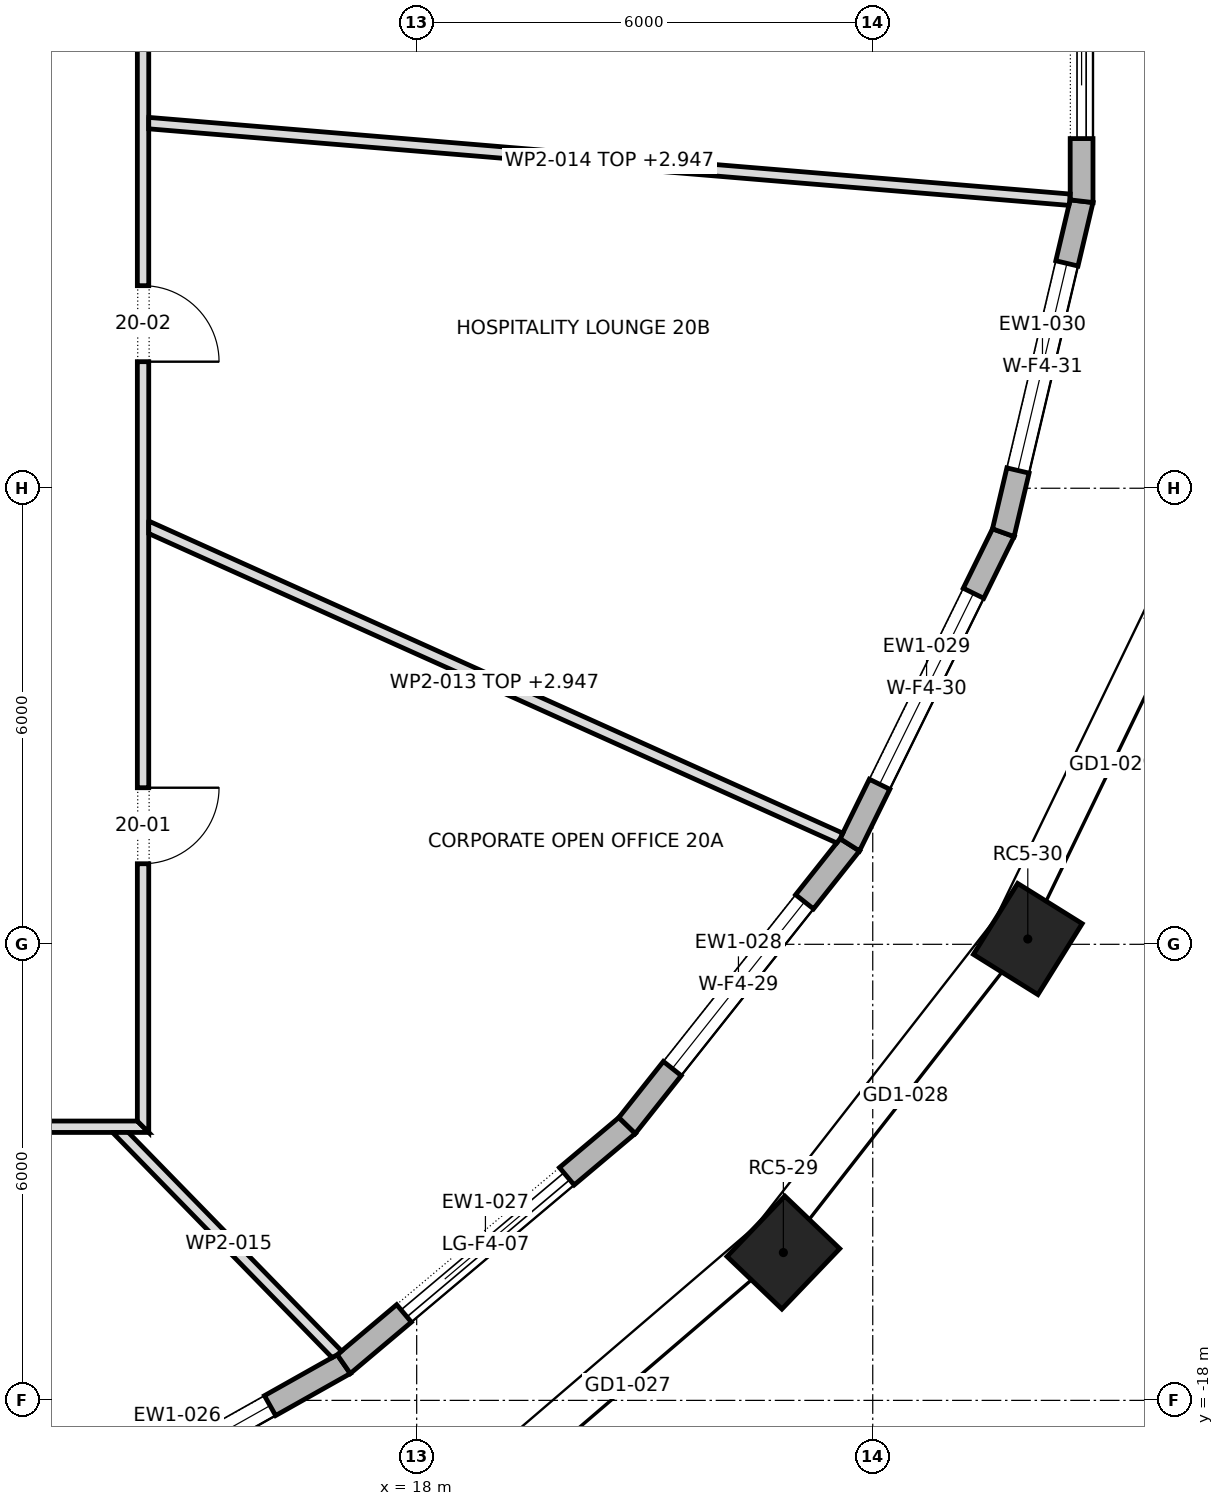
"""IFC4 building model, lengths in metres.
Left out: names, types, materials, properties, quantities, classifications, styles, units other than length and angle.
Written with IfcOpenShell. Run it as: python <this file> out.ifc"""

import sys

from ifc_helpers import new_model, si_unit, direction, frame, frame_2d, origin, origin_2d, place, context, subcontext, project, spatial, polyline, rectangle, outline, extrude, element, fill, save


model = new_model("IFC4")
c1 = context("Model", 3, precision=1e-05, world=origin(), true_north=direction((0.0, 1.0)))
c2 = subcontext(c1, "Body", "Model", "MODEL_VIEW")
j1 = project(units=[si_unit("LENGTHUNIT", "METRE"), si_unit("PLANEANGLEUNIT", "RADIAN")], contexts=[c1])
p1 = place(None, origin())
s1 = spatial("IfcSite", under=j1, at=p1, CompositionType="ELEMENT")
p2 = place(p1, origin())
s2 = spatial("IfcBuilding", under=s1, at=p2, CompositionType="ELEMENT")
p3 = place(p2, frame((0.0, 0.0, 280.3)))
s3 = spatial("IfcBuildingStorey", under=s2, at=p3, CompositionType="ELEMENT", Elevation=280.3)
for number, where, z_axis, x_axis in (
    (1, (22.824, -16.055, 0.0), (0.0, 0.0, 1.0), (0.692, 0.722, 0.0)),
    (2, (26.04, -11.93, 0.0), (0.0, 0.0, 1.0), (0.529, 0.849, 0.0)),
):
    element("IfcColumn", number, at=place(p3, frame(where, z_axis=z_axis, x_axis=x_axis)), inside=s3, PredefinedType="COLUMN", context=c2, shape_type="SweptSolid", body=[
        extrude(rectangle(XDim=1.1, YDim=1.0, at=origin_2d()), origin(), (0.0, 0.0, 1.0), 4.0),
    ])
p4 = place(p3, frame((12.661, -19.988, 0.0), z_axis=(0.0, 0.0, 1.0), x_axis=(0.871488606878, 0.490415750239, 0.0)))
e3 = element("IfcWall", 3, at=p4, inside=s3, PredefinedType="STANDARD", context=c2, shape_type="SweptSolid", body=[
    extrude(outline(polyline([(-0.013, -0.15), (5.04, -0.15), (5.012, 0.15), (0.013, 0.15), (-0.013, -0.15)])), origin(), (0.0, 0.0, 1.0), 3.7),
])
p5 = place(p4, frame((1.113, 0.0, 0.6)))
e4 = element("IfcOpeningElement", 4, at=p5, cuts=e3, PredefinedType="OPENING", context=c2, shape_type="SweptSolid", body=[
    extrude(rectangle(XDim=2.8, YDim=2.65, at=frame_2d((1.4, 1.325))), frame((0.0, 0.162, 0.0), z_axis=(0.0, -1.0, 0.0), x_axis=(1.0, 0.0, 0.0)), (0.0, 0.0, 1.0), 0.324),
])
p6 = place(p3, frame((17.041, -17.523, 0.0), z_axis=(0.0, 0.0, 1.0), x_axis=(0.764876116592, 0.644177402792, 0.0)))
e5 = element("IfcWall", 5, at=p6, inside=s3, PredefinedType="STANDARD", context=c2, shape_type="SweptSolid", body=[
    extrude(outline(polyline([(-0.014, -0.15), (4.888, -0.15), (4.858, 0.15), (0.014, 0.15), (-0.014, -0.15)])), origin(), (0.0, 0.0, 1.0), 3.7),
])
p7 = place(p6, frame((1.036, 0.0, 0.0)))
e6 = element("IfcOpeningElement", 6, at=p7, cuts=e5, PredefinedType="OPENING", context=c2, shape_type="SweptSolid", body=[
    extrude(rectangle(XDim=2.8, YDim=3.25, at=frame_2d((1.4, 1.625))), frame((0.0, 0.162, 0.0), z_axis=(0.0, -1.0, 0.0), x_axis=(1.0, 0.0, 0.0)), (0.0, 0.0, 1.0), 0.324),
])
p8 = place(p3, frame((20.768, -14.384, 0.0), z_axis=(0.0, 0.0, 1.0), x_axis=(0.621544881236, 0.783378555112, 0.0)))
e7 = element("IfcWall", 7, at=p8, inside=s3, PredefinedType="STANDARD", context=c2, shape_type="SweptSolid", body=[
    extrude(outline(polyline([(-0.015, -0.15), (4.73, -0.15), (4.698, 0.15), (0.015, 0.15), (-0.015, -0.15)])), origin(), (0.0, 0.0, 1.0), 3.7),
])
p9 = place(p8, frame((0.957, 0.0, 0.6)))
e8 = element("IfcOpeningElement", 8, at=p9, cuts=e7, PredefinedType="OPENING", context=c2, shape_type="SweptSolid", body=[
    extrude(rectangle(XDim=2.8, YDim=2.65, at=frame_2d((1.4, 1.325))), frame((0.0, 0.162, 0.0), z_axis=(0.0, -1.0, 0.0), x_axis=(1.0, 0.0, 0.0)), (0.0, 0.0, 1.0), 0.324),
])
p10 = place(p3, frame((23.698, -10.691, 0.0), z_axis=(0.0, 0.0, 1.0), x_axis=(0.441335149795, 0.897342345794, 0.0)))
e9 = element("IfcWall", 9, at=p10, inside=s3, PredefinedType="STANDARD", context=c2, shape_type="SweptSolid", body=[
    extrude(outline(polyline([(-0.016, -0.15), (4.593, -0.15), (4.559, 0.15), (0.016, 0.15), (-0.016, -0.15)])), origin(), (0.0, 0.0, 1.0), 3.7),
])
p11 = place(p10, frame((0.888, 0.0, 0.6)))
e10 = element("IfcOpeningElement", 10, at=p11, cuts=e9, PredefinedType="OPENING", context=c2, shape_type="SweptSolid", body=[
    extrude(rectangle(XDim=2.8, YDim=2.65, at=frame_2d((1.4, 1.325))), frame((0.0, 0.162, 0.0), z_axis=(0.0, -1.0, 0.0), x_axis=(1.0, 0.0, 0.0)), (0.0, 0.0, 1.0), 0.324),
])
p12 = place(p3, frame((25.718, -6.585, 0.0), z_axis=(0.0, 0.0, 1.0), x_axis=(0.229862207503, 0.973223183839, 0.0)))
e11 = element("IfcWall", 11, at=p12, inside=s3, PredefinedType="STANDARD", context=c2, shape_type="SweptSolid", body=[
    extrude(outline(polyline([(-0.017, -0.15), (4.499, -0.15), (4.463, 0.15), (0.017, 0.15), (-0.017, -0.15)])), origin(), (0.0, 0.0, 1.0), 3.7),
])
p13 = place(p12, frame((0.841, 0.0, 0.6)))
e12 = element("IfcOpeningElement", 12, at=p13, cuts=e11, PredefinedType="OPENING", context=c2, shape_type="SweptSolid", body=[
    extrude(rectangle(XDim=2.8, YDim=2.65, at=frame_2d((1.4, 1.325))), frame((0.0, 0.162, 0.0), z_axis=(0.0, -1.0, 0.0), x_axis=(1.0, 0.0, 0.0)), (0.0, 0.0, 1.0), 0.324),
])
p14 = place(p3, frame((26.748, -2.224, 0.0), z_axis=(0.0, 0.0, 1.0), x_axis=(0.0, 1.0, 0.0)))
e13 = element("IfcWall", 13, at=p14, inside=s3, PredefinedType="STANDARD", context=c2, shape_type="SweptSolid", body=[
    extrude(outline(polyline([(-0.018, -0.15), (4.465, -0.15), (4.43, 0.15), (0.018, 0.15), (-0.018, -0.15)])), origin(), (0.0, 0.0, 1.0), 3.7),
])
p15 = place(p14, frame((0.824, 0.0, 0.0)))
e14 = element("IfcOpeningElement", 14, at=p15, cuts=e13, PredefinedType="OPENING", context=c2, shape_type="SweptSolid", body=[
    extrude(rectangle(XDim=2.8, YDim=3.25, at=frame_2d((1.4, 1.625))), frame((0.0, 0.162, 0.0), z_axis=(0.0, -1.0, 0.0), x_axis=(1.0, 0.0, 0.0)), (0.0, 0.0, 1.0), 0.324),
])
p16 = place(p3, frame((-14.475, -14.4, 0.0), z_axis=(0.0, 0.0, 1.0), x_axis=(1.0, 0.0, 0.0)))
e15 = element("IfcWall", 15, at=p16, inside=s3, PredefinedType="PARTITIONING", context=c2, shape_type="SweptSolid", body=[
    extrude(outline(polyline([(0.0, -0.075), (1.93, -0.075), (3.86, -0.075), (5.79, -0.075), (7.72, -0.075), (9.65, -0.075), (11.58, -0.075), (13.51, -0.075), (15.44, -0.075), (17.37, -0.075), (19.3, -0.075), (21.23, -0.075), (23.16, -0.075), (25.09, -0.075), (27.02, -0.075), (28.95, -0.075), (28.8, 0.075), (26.89, 0.075), (24.98, 0.075), (23.07, 0.075), (21.16, 0.075), (19.25, 0.075), (17.34, 0.075), (15.43, 0.075), (13.52, 0.075), (11.61, 0.075), (9.7, 0.075), (7.79, 0.075), (5.88, 0.075), (3.97, 0.075), (2.06, 0.075), (0.15, 0.075), (0.0, -0.075)])), origin(), (0.0, 0.0, 1.0), 3.7),
])
p17 = place(p16, frame((5.535, 0.0, 0.0)))
e16 = element("IfcOpeningElement", 16, at=p17, cuts=e15, PredefinedType="OPENING", context=c2, shape_type="SweptSolid", body=[
    extrude(rectangle(XDim=1.8, YDim=2.1, at=frame_2d((0.9, 1.05))), frame((0.0, 0.087, 0.0), z_axis=(0.0, -1.0, 0.0), x_axis=(1.0, 0.0, 0.0)), (0.0, 0.0, 1.0), 0.174),
])
p18 = place(p16, frame((15.73, 0.0, 0.0)))
e17 = element("IfcOpeningElement", 17, at=p18, cuts=e15, PredefinedType="OPENING", context=c2, shape_type="SweptSolid", body=[
    extrude(rectangle(XDim=1.0, YDim=2.1, at=frame_2d((0.5, 1.05))), frame((0.0, 0.087, 0.0), z_axis=(0.0, -1.0, 0.0), x_axis=(1.0, 0.0, 0.0)), (0.0, 0.0, 1.0), 0.174),
])
p19 = place(p16, frame((23.585, 0.0, 0.0)))
e18 = element("IfcOpeningElement", 18, at=p19, cuts=e15, PredefinedType="OPENING", context=c2, shape_type="SweptSolid", body=[
    extrude(rectangle(XDim=1.0, YDim=2.1, at=frame_2d((0.5, 1.05))), frame((0.0, 0.087, 0.0), z_axis=(0.0, -1.0, 0.0), x_axis=(1.0, 0.0, 0.0)), (0.0, 0.0, 1.0), 0.174),
])
p20 = place(p3, frame((14.4, -14.475, 0.0), z_axis=(0.0, 0.0, 1.0), x_axis=(0.0, 1.0, 0.0)))
e19 = element("IfcWall", 19, at=p20, inside=s3, PredefinedType="PARTITIONING", context=c2, shape_type="SweptSolid", body=[
    extrude(outline(polyline([(0.0, -0.075), (1.93, -0.075), (3.86, -0.075), (5.79, -0.075), (7.72, -0.075), (9.65, -0.075), (11.58, -0.075), (13.51, -0.075), (15.44, -0.075), (17.37, -0.075), (19.3, -0.075), (21.23, -0.075), (23.16, -0.075), (25.09, -0.075), (27.02, -0.075), (28.95, -0.075), (28.8, 0.075), (26.89, 0.075), (24.98, 0.075), (23.07, 0.075), (21.16, 0.075), (19.25, 0.075), (17.34, 0.075), (15.43, 0.075), (13.52, 0.075), (11.61, 0.075), (9.7, 0.075), (7.79, 0.075), (5.88, 0.075), (3.97, 0.075), (2.06, 0.075), (0.15, 0.075), (0.0, -0.075)])), origin(), (0.0, 0.0, 1.0), 3.7),
])
p21 = place(p20, frame((3.535, 0.0, 0.0)))
e20 = element("IfcOpeningElement", 20, at=p21, cuts=e19, PredefinedType="OPENING", context=c2, shape_type="SweptSolid", body=[
    extrude(rectangle(XDim=1.0, YDim=2.1, at=frame_2d((0.5, 1.05))), frame((0.0, 0.087, 0.0), z_axis=(0.0, -1.0, 0.0), x_axis=(1.0, 0.0, 0.0)), (0.0, 0.0, 1.0), 0.174),
])
p22 = place(p20, frame((10.14, 0.0, 0.0)))
e21 = element("IfcOpeningElement", 21, at=p22, cuts=e19, PredefinedType="OPENING", context=c2, shape_type="SweptSolid", body=[
    extrude(rectangle(XDim=1.0, YDim=2.1, at=frame_2d((0.5, 1.05))), frame((0.0, 0.087, 0.0), z_axis=(0.0, -1.0, 0.0), x_axis=(1.0, 0.0, 0.0)), (0.0, 0.0, 1.0), 0.174),
])
p23 = place(p20, frame((20.18, 0.0, 0.0)))
e22 = element("IfcOpeningElement", 22, at=p23, cuts=e19, PredefinedType="OPENING", context=c2, shape_type="SweptSolid", body=[
    extrude(rectangle(XDim=1.8, YDim=2.1, at=frame_2d((0.9, 1.05))), frame((0.0, 0.087, 0.0), z_axis=(0.0, -1.0, 0.0), x_axis=(1.0, 0.0, 0.0)), (0.0, 0.0, 1.0), 0.174),
])
p24 = place(p3, frame((14.445, -6.5, 0.0), z_axis=(0.0, 0.0, 1.0), x_axis=(0.912008635086, -0.410171000351, 0.0)))
e23 = element("IfcWall", 23, at=p24, inside=s3, PredefinedType="PARTITIONING", context=c2, shape_type="SweptSolid", body=[
    extrude(outline(polyline([(0.067, -0.075), (2.052, -0.075), (4.037, -0.075), (6.021, -0.075), (8.006, -0.075), (9.991, -0.075), (10.009, -0.005), (10.011, 0.071), (10.011, 0.075), (8.343, 0.075), (6.674, 0.075), (5.006, 0.075), (3.337, 0.075), (1.668, 0.075), (0.0, 0.075), (0.0, 0.074), (0.067, -0.075)])), origin(), (0.0, 0.0, 1.0), 2.947),
])
p25 = place(p3, frame((14.469, -1.196, 0.0), z_axis=(0.0, 0.0, 1.0), x_axis=(0.996556684965, -0.08291425481, 0.0)))
e24 = element("IfcWall", 24, at=p25, inside=s3, PredefinedType="PARTITIONING", context=c2, shape_type="SweptSolid", body=[
    extrude(outline(polyline([(0.012, -0.075), (1.747, -0.075), (3.483, -0.075), (5.218, -0.075), (6.953, -0.075), (8.689, -0.075), (10.424, -0.075), (12.159, -0.075), (12.164, -0.045), (12.164, 0.075), (10.426, 0.075), (8.688, 0.075), (6.951, 0.075), (5.213, 0.075), (3.475, 0.075), (1.738, 0.075), (0.0, 0.075), (0.0, 0.07), (0.012, -0.075)])), origin(), (0.0, 0.0, 1.0), 2.947),
])
p26 = place(p3, frame((16.958, -17.403, 0.0), z_axis=(0.0, 0.0, 1.0), x_axis=(-0.698164782934, 0.715937103293, 0.0)))
e25 = element("IfcWall", 25, at=p26, inside=s3, PredefinedType="PARTITIONING", context=c2, shape_type="SweptSolid", body=[
    extrude(outline(polyline([(0.0, -0.075), (1.339, -0.075), (2.678, -0.075), (4.016, -0.075), (4.069, -0.021), (4.069, -0.021), (4.162, 0.075), (4.162, 0.075), (2.783, 0.075), (1.404, 0.075), (0.025, 0.075), (0.005, -0.0), (0.0, -0.067), (0.0, -0.075)])), origin(), (0.0, 0.0, 1.0), 3.7),
])
p27 = place(p5, origin())
e26 = element("IfcWindow", 26, at=p27, inside=s3, PartitioningType="DOUBLE_PANEL_VERTICAL", PredefinedType="WINDOW", context=c2, shape_type="SweptSolid", body=[
    extrude(rectangle(XDim=2.8, YDim=2.65, at=frame_2d((1.4, 1.325))), frame((0.0, 0.03, 0.0), z_axis=(0.0, -1.0, 0.0), x_axis=(1.0, 0.0, 0.0)), (0.0, 0.0, 1.0), 0.06),
])
fill(e4, e26)
p28 = place(p7, origin())
e27 = element("IfcDoor", 27, at=p28, inside=s3, OperationType="DOUBLE_DOOR_SLIDING", PredefinedType="DOOR", context=c2, shape_type="SweptSolid", body=[
    extrude(rectangle(XDim=2.8, YDim=3.25, at=frame_2d((1.4, 1.625))), frame((0.0, 0.025, 0.0), z_axis=(0.0, -1.0, 0.0), x_axis=(1.0, 0.0, 0.0)), (0.0, 0.0, 1.0), 0.05),
])
fill(e6, e27)
p29 = place(p9, origin())
e28 = element("IfcWindow", 28, at=p29, inside=s3, PartitioningType="DOUBLE_PANEL_VERTICAL", PredefinedType="WINDOW", context=c2, shape_type="SweptSolid", body=[
    extrude(rectangle(XDim=2.8, YDim=2.65, at=frame_2d((1.4, 1.325))), frame((0.0, 0.03, 0.0), z_axis=(0.0, -1.0, 0.0), x_axis=(1.0, 0.0, 0.0)), (0.0, 0.0, 1.0), 0.06),
])
fill(e8, e28)
p30 = place(p11, origin())
e29 = element("IfcWindow", 29, at=p30, inside=s3, PartitioningType="DOUBLE_PANEL_VERTICAL", PredefinedType="WINDOW", context=c2, shape_type="SweptSolid", body=[
    extrude(rectangle(XDim=2.8, YDim=2.65, at=frame_2d((1.4, 1.325))), frame((0.0, 0.03, 0.0), z_axis=(0.0, -1.0, 0.0), x_axis=(1.0, 0.0, 0.0)), (0.0, 0.0, 1.0), 0.06),
])
fill(e10, e29)
p31 = place(p13, origin())
e30 = element("IfcWindow", 30, at=p31, inside=s3, PartitioningType="DOUBLE_PANEL_VERTICAL", PredefinedType="WINDOW", context=c2, shape_type="SweptSolid", body=[
    extrude(rectangle(XDim=2.8, YDim=2.65, at=frame_2d((1.4, 1.325))), frame((0.0, 0.03, 0.0), z_axis=(0.0, -1.0, 0.0), x_axis=(1.0, 0.0, 0.0)), (0.0, 0.0, 1.0), 0.06),
])
fill(e12, e30)
p32 = place(p15, origin())
e31 = element("IfcDoor", 31, at=p32, inside=s3, OperationType="DOUBLE_DOOR_SLIDING", PredefinedType="DOOR", context=c2, shape_type="SweptSolid", body=[
    extrude(rectangle(XDim=2.8, YDim=3.25, at=frame_2d((1.4, 1.625))), frame((0.0, 0.025, 0.0), z_axis=(0.0, -1.0, 0.0), x_axis=(1.0, 0.0, 0.0)), (0.0, 0.0, 1.0), 0.05),
])
fill(e14, e31)
p33 = place(p21, frame((1.0, 0.0, 0.0), z_axis=(0.0, 0.0, 1.0), x_axis=(-1.0, 0.0, 0.0)))
e32 = element("IfcDoor", 32, at=p33, inside=s3, OperationType="SINGLE_SWING_RIGHT", PredefinedType="DOOR", context=c2, shape_type="SweptSolid", body=[
    extrude(rectangle(XDim=1.0, YDim=2.1, at=frame_2d((0.5, 1.05))), frame((0.0, 0.025, 0.0), z_axis=(0.0, -1.0, 0.0), x_axis=(1.0, 0.0, 0.0)), (0.0, 0.0, 1.0), 0.05),
])
fill(e20, e32)
p34 = place(p22, frame((1.0, 0.0, 0.0), z_axis=(0.0, 0.0, 1.0), x_axis=(-1.0, 0.0, 0.0)))
e33 = element("IfcDoor", 33, at=p34, inside=s3, OperationType="SINGLE_SWING_LEFT", PredefinedType="DOOR", context=c2, shape_type="SweptSolid", body=[
    extrude(rectangle(XDim=1.0, YDim=2.1, at=frame_2d((0.5, 1.05))), frame((0.0, 0.025, 0.0), z_axis=(0.0, -1.0, 0.0), x_axis=(1.0, 0.0, 0.0)), (0.0, 0.0, 1.0), 0.05),
])
fill(e21, e33)
save(model, sys.argv[1])
